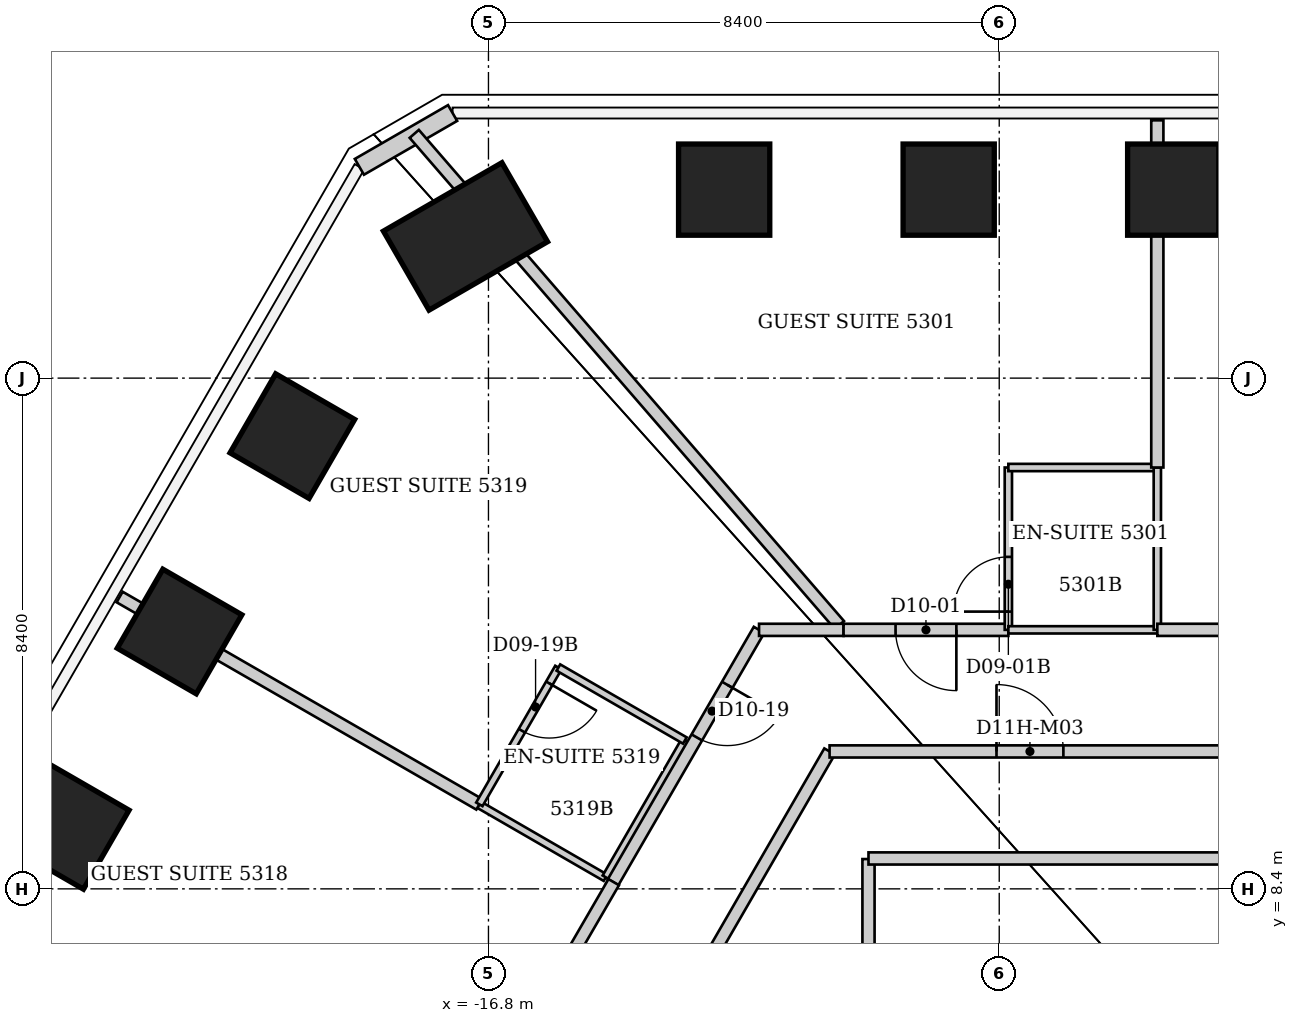
"""IFC4 building model, lengths in metres.
Left out: names, types, materials, properties, quantities, classifications, styles, units other than length and angle.
Written with IfcOpenShell. Run it as: python <this file> out.ifc"""

import sys

from ifc_helpers import new_model, si_unit, direction, frame, frame_2d, origin, origin_2d, place, context, subcontext, project, spatial, rectangle, extrude, element, fill, save


model = new_model("IFC4")
c1 = context("Model", 3, precision=1e-05, world=origin(), true_north=direction((0.0, 1.0)))
c2 = subcontext(c1, "Body", "Model", "MODEL_VIEW")
j1 = project(units=[si_unit("LENGTHUNIT", "METRE"), si_unit("PLANEANGLEUNIT", "RADIAN")], contexts=[c1])
p1 = place(None, origin())
s1 = spatial("IfcSite", under=j1, at=p1, CompositionType="ELEMENT")
p2 = place(p1, origin())
s2 = spatial("IfcBuilding", under=s1, at=p2, CompositionType="ELEMENT")
p3 = place(p2, frame((0.0, 0.0, 213.6)))
s3 = spatial("IfcBuildingStorey", under=s2, at=p3, CompositionType="ELEMENT", Elevation=213.6)
for number, where, z_axis, x_axis in (
    (1, (-12.924, 19.9, 0.0), (0.0, 0.0, 1.0), (0.0, 1.0, 0.0)),
    (2, (-9.231, 19.9, 0.0), (0.0, 0.0, 1.0), (0.0, 1.0, 0.0)),
    (3, (-5.539, 19.9, 0.0), (0.0, 0.0, 1.0), (0.0, 1.0, 0.0)),
    (4, (-23.735, 9.419, 0.0), (0.0, 0.0, 1.0), (-0.866, 0.5, 0.0)),
    (5, (-21.88, 12.633, 0.0), (0.0, 0.0, 1.0), (-0.866, 0.5, 0.0)),
    (6, (-20.025, 15.846, 0.0), (0.0, 0.0, 1.0), (-0.866, 0.5, 0.0)),
):
    element("IfcColumn", number, at=place(p3, frame(where, z_axis=z_axis, x_axis=x_axis)), inside=s3, PredefinedType="COLUMN", context=c2, shape_type="SweptSolid", body=[
        extrude(rectangle(XDim=1.5, YDim=1.5, at=origin_2d()), origin(), (0.0, 0.0, 1.0), 3.8),
    ])
p4 = place(p3, frame((-17.178, 19.131, 0.0), z_axis=(0.0, 0.0, 1.0), x_axis=(-0.5, 0.866025403784, 0.0)))
e7 = element("IfcColumn", 7, at=p4, inside=s3, PredefinedType="COLUMN", context=c2, shape_type="SweptSolid", body=[
    extrude(rectangle(XDim=1.5, YDim=2.25, at=origin_2d()), origin(), (0.0, 0.0, 1.0), 3.8),
])
p5 = place(p3, frame((-18.923, 20.275, 0.0), z_axis=(0.0, 0.0, 1.0), x_axis=(0.866036293601, 0.499981137809, 0.0)))
e8 = element("IfcWall", 8, at=p5, inside=s3, PredefinedType="SOLIDWALL", context=c2, shape_type="SweptSolid", body=[
    extrude(rectangle(XDim=1.77, YDim=0.3, at=frame_2d((0.885, 0.0))), origin(), (0.0, 0.0, 1.0), 3.64),
])
p6 = place(p3, frame((-16.954, 9.783, 0.0), z_axis=(0.0, 0.0, 1.0), x_axis=(0.865862137391, -0.500282679124, 0.0)))
e9 = element("IfcWall", 9, at=p6, inside=s3, PredefinedType="PARTITIONING", context=c2, shape_type="SweptSolid", body=[
    extrude(rectangle(XDim=2.401, YDim=0.12, at=frame_2d((1.201, 0.0))), origin(), (0.0, 0.0, 1.0), 2.878),
])
p7 = place(p3, frame((-16.95, 9.79, 0.0), z_axis=(0.0, 0.0, 1.0), x_axis=(-0.866371236465, 0.499400521251, 0.0)))
e10 = element("IfcWall", 10, at=p7, inside=s3, PredefinedType="PARTITIONING", context=c2, shape_type="SweptSolid", body=[
    extrude(rectangle(XDim=6.829, YDim=0.2, at=frame_2d((3.414, 0.0))), origin(), (0.0, 0.0, 1.0), 2.878),
])
p8 = place(p3, frame((-15.65, 12.04, 0.0), z_axis=(0.0, 0.0, 1.0), x_axis=(-0.500291685314, -0.865856933682, 0.0)))
e11 = element("IfcWall", 11, at=p8, inside=s3, PredefinedType="PARTITIONING", context=c2, shape_type="SweptSolid", body=[
    extrude(rectangle(XDim=2.599, YDim=0.12, at=frame_2d((1.299, 0.0))), origin(), (0.0, 0.0, 1.0), 3.64),
])
p9 = place(p8, frame((0.3, 0.0, 0.0)))
e12 = element("IfcOpeningElement", 12, at=p9, cuts=e11, PredefinedType="OPENING", context=c2, shape_type="SweptSolid", body=[
    extrude(rectangle(XDim=0.9, YDim=2.03, at=frame_2d((0.45, 1.015))), frame((0.0, 0.06, 0.0), z_axis=(0.0, -1.0, 0.0), x_axis=(1.0, 0.0, 0.0)), (0.0, 0.0, 1.0), 0.12),
])
p10 = place(p3, frame((-14.87, 8.59, 0.0), z_axis=(0.0, 0.0, 1.0), x_axis=(0.500291685314, 0.865856933682, 0.0)))
e13 = element("IfcWall", 13, at=p10, inside=s3, PredefinedType="PARTITIONING", context=c2, shape_type="SweptSolid", body=[
    extrude(rectangle(XDim=2.599, YDim=0.12, at=frame_2d((1.299, 0.0))), origin(), (0.0, 0.0, 1.0), 3.64),
])
p11 = place(p3, frame((-14.827, 8.554, 0.0), z_axis=(0.0, 0.0, 1.0), x_axis=(0.865865073245, -0.500277597875, 0.0)))
e14 = element("IfcWall", 14, at=p11, inside=s3, PredefinedType="PARTITIONING", context=c2, shape_type="SweptSolid", body=[
    extrude(rectangle(XDim=0.089, YDim=0.2, at=frame_2d((0.044, 0.0))), origin(), (0.0, 0.0, 1.0), 3.64),
])
p12 = place(p3, frame((-14.75, 8.51, 0.0), z_axis=(0.0, 0.0, 1.0), x_axis=(0.500618647881, 0.86566793252, 0.0)))
e15 = element("IfcWall", 15, at=p12, inside=s3, PredefinedType="PARTITIONING", context=c2, shape_type="SweptSolid", body=[
    extrude(rectangle(XDim=4.794, YDim=0.2, at=frame_2d((2.397, 0.0))), origin(), (0.0, 0.0, 1.0), 3.64),
])
p13 = place(p12, frame((2.75, 0.0, 0.0)))
e16 = element("IfcOpeningElement", 16, at=p13, cuts=e15, PredefinedType="OPENING", context=c2, shape_type="SweptSolid", body=[
    extrude(rectangle(XDim=1.0, YDim=2.13, at=frame_2d((0.5, 1.065))), frame((0.0, 0.1, 0.0), z_axis=(0.0, -1.0, 0.0), x_axis=(1.0, 0.0, 0.0)), (0.0, 0.0, 1.0), 0.2),
])
p14 = place(p3, frame((-14.74, 8.51, 0.0), z_axis=(0.0, 0.0, 1.0), x_axis=(-0.501513165407, -0.865150012959, 0.0)))
e17 = element("IfcWall", 17, at=p14, inside=s3, PredefinedType="PARTITIONING", context=c2, shape_type="SweptSolid", body=[
    extrude(rectangle(XDim=4.6, YDim=0.2, at=frame_2d((2.3, 0.0))), origin(), (0.0, 0.0, 1.0), 3.64),
])
p15 = place(p14, frame((1.8, 0.0, 0.0)))
e18 = element("IfcOpeningElement", 18, at=p15, cuts=e17, PredefinedType="OPENING", context=c2, shape_type="SweptSolid", body=[
    extrude(rectangle(XDim=1.0, YDim=2.13, at=frame_2d((0.5, 1.065))), frame((0.0, 0.1, 0.0), z_axis=(0.0, -1.0, 0.0), x_axis=(1.0, 0.0, 0.0)), (0.0, 0.0, 1.0), 0.2),
])
p16 = place(p3, frame((-13.83, 6.09, 0.0), z_axis=(0.0, 0.0, 1.0), x_axis=(0.500248310865, 0.865881993967, 0.0)))
e19 = element("IfcWall", 19, at=p16, inside=s3, PredefinedType="PARTITIONING", context=c2, shape_type="SweptSolid", body=[
    extrude(rectangle(XDim=5.278, YDim=0.2, at=frame_2d((2.639, 0.0))), origin(), (0.0, 0.0, 1.0), 3.64),
])
p17 = place(p3, frame((-13.57, 10.84, 0.0), z_axis=(0.0, 0.0, 1.0), x_axis=(-0.866177122335, 0.499737123639, 0.0)))
e20 = element("IfcWall", 20, at=p17, inside=s3, PredefinedType="PARTITIONING", context=c2, shape_type="SweptSolid", body=[
    extrude(rectangle(XDim=2.401, YDim=0.12, at=frame_2d((1.201, 0.0))), origin(), (0.0, 0.0, 1.0), 3.64),
])
p18 = place(p3, frame((-11.19, 10.66, 0.0), z_axis=(0.0, 0.0, 1.0), x_axis=(1.0, 0.0, 0.0)))
e21 = element("IfcWall", 21, at=p18, inside=s3, PredefinedType="PARTITIONING", context=c2, shape_type="SweptSolid", body=[
    extrude(rectangle(XDim=6.59, YDim=0.2, at=frame_2d((3.295, 0.0))), origin(), (0.0, 0.0, 1.0), 3.64),
])
p19 = place(p18, frame((2.745, 0.0, 0.0)))
e22 = element("IfcOpeningElement", 22, at=p19, cuts=e21, PredefinedType="OPENING", context=c2, shape_type="SweptSolid", body=[
    extrude(rectangle(XDim=1.1, YDim=2.2, at=frame_2d((0.55, 1.1))), frame((0.0, 0.1, 0.0), z_axis=(0.0, -1.0, 0.0), x_axis=(1.0, 0.0, 0.0)), (0.0, 0.0, 1.0), 0.2),
])
p20 = place(p3, frame((-11.029, 12.74, 0.0), z_axis=(0.0, 0.0, 1.0), x_axis=(-0.654429261747, 0.756123231603, 0.0)))
e23 = element("IfcWall", 23, at=p20, inside=s3, PredefinedType="PARTITIONING", context=c2, shape_type="SweptSolid", body=[
    extrude(rectangle(XDim=10.683, YDim=0.2, at=frame_2d((5.342, 0.0))), origin(), (0.0, 0.0, 1.0), 3.64),
])
p21 = place(p3, frame((-10.96, 12.66, 0.0), z_axis=(0.0, 0.0, 1.0), x_axis=(-1.0, 0.0, 0.0)))
e24 = element("IfcWall", 24, at=p21, inside=s3, PredefinedType="PARTITIONING", context=c2, shape_type="SweptSolid", body=[
    extrude(rectangle(XDim=1.39, YDim=0.2, at=frame_2d((0.695, 0.0))), origin(), (0.0, 0.0, 1.0), 3.64),
])
p22 = place(p3, frame((-10.55, 8.89, 0.0), z_axis=(0.0, 0.0, 1.0), x_axis=(0.0, -1.0, 0.0)))
e25 = element("IfcWall", 25, at=p22, inside=s3, PredefinedType="PARTITIONING", context=c2, shape_type="SweptSolid", body=[
    extrude(rectangle(XDim=2.8, YDim=0.2, at=frame_2d((1.4, 0.0))), origin(), (0.0, 0.0, 1.0), 3.64),
])
p23 = place(p3, frame((-8.25, 12.66, 0.0), z_axis=(0.0, 0.0, 1.0), x_axis=(-1.0, 0.0, 0.0)))
e26 = element("IfcWall", 26, at=p23, inside=s3, PredefinedType="PARTITIONING", context=c2, shape_type="SweptSolid", body=[
    extrude(rectangle(XDim=2.71, YDim=0.2, at=frame_2d((1.355, 0.0))), origin(), (0.0, 0.0, 1.0), 3.64),
])
p24 = place(p23, frame((0.855, 0.0, 0.0)))
e27 = element("IfcOpeningElement", 27, at=p24, cuts=e26, PredefinedType="OPENING", context=c2, shape_type="SweptSolid", body=[
    extrude(rectangle(XDim=1.0, YDim=2.13, at=frame_2d((0.5, 1.065))), frame((0.0, 0.1, 0.0), z_axis=(0.0, -1.0, 0.0), x_axis=(1.0, 0.0, 0.0)), (0.0, 0.0, 1.0), 0.2),
])
p25 = place(p3, frame((-8.25, 15.33, 0.0), z_axis=(0.0, 0.0, 1.0), x_axis=(0.0, -1.0, 0.0)))
e28 = element("IfcWall", 28, at=p25, inside=s3, PredefinedType="PARTITIONING", context=c2, shape_type="SweptSolid", body=[
    extrude(rectangle(XDim=2.67, YDim=0.12, at=frame_2d((1.335, 0.0))), origin(), (0.0, 0.0, 1.0), 3.64),
])
p26 = place(p25, frame((1.47, 0.0, 0.0)))
e29 = element("IfcOpeningElement", 29, at=p26, cuts=e28, PredefinedType="OPENING", context=c2, shape_type="SweptSolid", body=[
    extrude(rectangle(XDim=0.9, YDim=2.03, at=frame_2d((0.45, 1.015))), frame((0.0, 0.06, 0.0), z_axis=(0.0, -1.0, 0.0), x_axis=(1.0, 0.0, 0.0)), (0.0, 0.0, 1.0), 0.12),
])
for number, where, z_axis, x_axis in (
    (30, (-5.8, 12.66, 0.0), (0.0, 0.0, 1.0), (-1.0, 0.0, 0.0)),
    (31, (-5.8, 15.33, 0.0), (0.0, 0.0, 1.0), (-1.0, 0.0, 0.0)),
):
    element("IfcWall", number, at=place(p3, frame(where, z_axis=z_axis, x_axis=x_axis)), inside=s3, PredefinedType="PARTITIONING", context=c2, shape_type="SweptSolid", body=[
        extrude(rectangle(XDim=2.45, YDim=0.12, at=frame_2d((1.225, 0.0))), origin(), (0.0, 0.0, 1.0), 3.64),
    ])
p27 = place(p3, frame((-5.8, 15.33, 0.0), z_axis=(0.0, 0.0, 1.0), x_axis=(0.0, -1.0, 0.0)))
e32 = element("IfcWall", 32, at=p27, inside=s3, PredefinedType="PARTITIONING", context=c2, shape_type="SweptSolid", body=[
    extrude(rectangle(XDim=2.67, YDim=0.12, at=frame_2d((1.335, 0.0))), origin(), (0.0, 0.0, 1.0), 3.64),
])
p28 = place(p3, frame((-5.8, 21.04, 0.0), z_axis=(0.0, 0.0, 1.0), x_axis=(0.0, -1.0, 0.0)))
e33 = element("IfcWall", 33, at=p28, inside=s3, PredefinedType="PARTITIONING", context=c2, shape_type="SweptSolid", body=[
    extrude(rectangle(XDim=5.71, YDim=0.2, at=frame_2d((2.855, 0.0))), origin(), (0.0, 0.0, 1.0), 3.64),
])
p29 = place(p3, frame((-4.6, 8.9, 0.0), z_axis=(0.0, 0.0, 1.0), x_axis=(-1.0, 0.0, 0.0)))
e34 = element("IfcWall", 34, at=p29, inside=s3, PredefinedType="PARTITIONING", context=c2, shape_type="SweptSolid", body=[
    extrude(rectangle(XDim=5.95, YDim=0.2, at=frame_2d((2.975, 0.0))), origin(), (0.0, 0.0, 1.0), 3.64),
])
p30 = place(p3, frame((3.35, 12.66, 0.0), z_axis=(0.0, 0.0, 1.0), x_axis=(-1.0, 0.0, 0.0)))
e35 = element("IfcWall", 35, at=p30, inside=s3, PredefinedType="PARTITIONING", context=c2, shape_type="SweptSolid", body=[
    extrude(rectangle(XDim=9.15, YDim=0.2, at=frame_2d((4.575, 0.0))), origin(), (0.0, 0.0, 1.0), 3.64),
])
p31 = place(p30, frame((4.075, 0.0, 0.0)))
e36 = element("IfcOpeningElement", 36, at=p31, cuts=e35, PredefinedType="OPENING", context=c2, shape_type="SweptSolid", body=[
    extrude(rectangle(XDim=1.0, YDim=2.13, at=frame_2d((0.5, 1.065))), frame((0.0, 0.1, 0.0), z_axis=(0.0, -1.0, 0.0), x_axis=(1.0, 0.0, 0.0)), (0.0, 0.0, 1.0), 0.2),
])
p32 = place(p24, origin())
e37 = element("IfcDoor", 37, at=p32, inside=s3, OperationType="SINGLE_SWING_LEFT", PredefinedType="DOOR", context=c2, shape_type="SweptSolid", body=[
    extrude(rectangle(XDim=1.0, YDim=2.13, at=frame_2d((0.5, 1.065))), frame((0.0, 0.025, 0.0), z_axis=(0.0, -1.0, 0.0), x_axis=(1.0, 0.0, 0.0)), (0.0, 0.0, 1.0), 0.05),
])
fill(e27, e37)
p33 = place(p26, origin())
e38 = element("IfcDoor", 38, at=p33, inside=s3, OperationType="SINGLE_SWING_RIGHT", PredefinedType="DOOR", context=c2, shape_type="SweptSolid", body=[
    extrude(rectangle(XDim=0.9, YDim=2.03, at=frame_2d((0.45, 1.015))), frame((0.0, 0.025, 0.0), z_axis=(0.0, -1.0, 0.0), x_axis=(1.0, 0.0, 0.0)), (0.0, 0.0, 1.0), 0.05),
])
fill(e29, e38)
p34 = place(p13, origin())
e39 = element("IfcDoor", 39, at=p34, inside=s3, OperationType="SINGLE_SWING_RIGHT", PredefinedType="DOOR", context=c2, shape_type="SweptSolid", body=[
    extrude(rectangle(XDim=1.0, YDim=2.13, at=frame_2d((0.5, 1.065))), frame((0.0, 0.025, 0.0), z_axis=(0.0, -1.0, 0.0), x_axis=(1.0, 0.0, 0.0)), (0.0, 0.0, 1.0), 0.05),
])
fill(e16, e39)
p35 = place(p9, origin())
e40 = element("IfcDoor", 40, at=p35, inside=s3, OperationType="SINGLE_SWING_LEFT", PredefinedType="DOOR", context=c2, shape_type="SweptSolid", body=[
    extrude(rectangle(XDim=0.9, YDim=2.03, at=frame_2d((0.45, 1.015))), frame((0.0, 0.025, 0.0), z_axis=(0.0, -1.0, 0.0), x_axis=(1.0, 0.0, 0.0)), (0.0, 0.0, 1.0), 0.05),
])
fill(e12, e40)
p36 = place(p19, origin())
e41 = element("IfcDoor", 41, at=p36, inside=s3, OperationType="SINGLE_SWING_LEFT", PredefinedType="DOOR", context=c2, shape_type="SweptSolid", body=[
    extrude(rectangle(XDim=1.1, YDim=2.2, at=frame_2d((0.55, 1.1))), frame((0.0, 0.025, 0.0), z_axis=(0.0, -1.0, 0.0), x_axis=(1.0, 0.0, 0.0)), (0.0, 0.0, 1.0), 0.05),
])
fill(e22, e41)
save(model, sys.argv[1])
